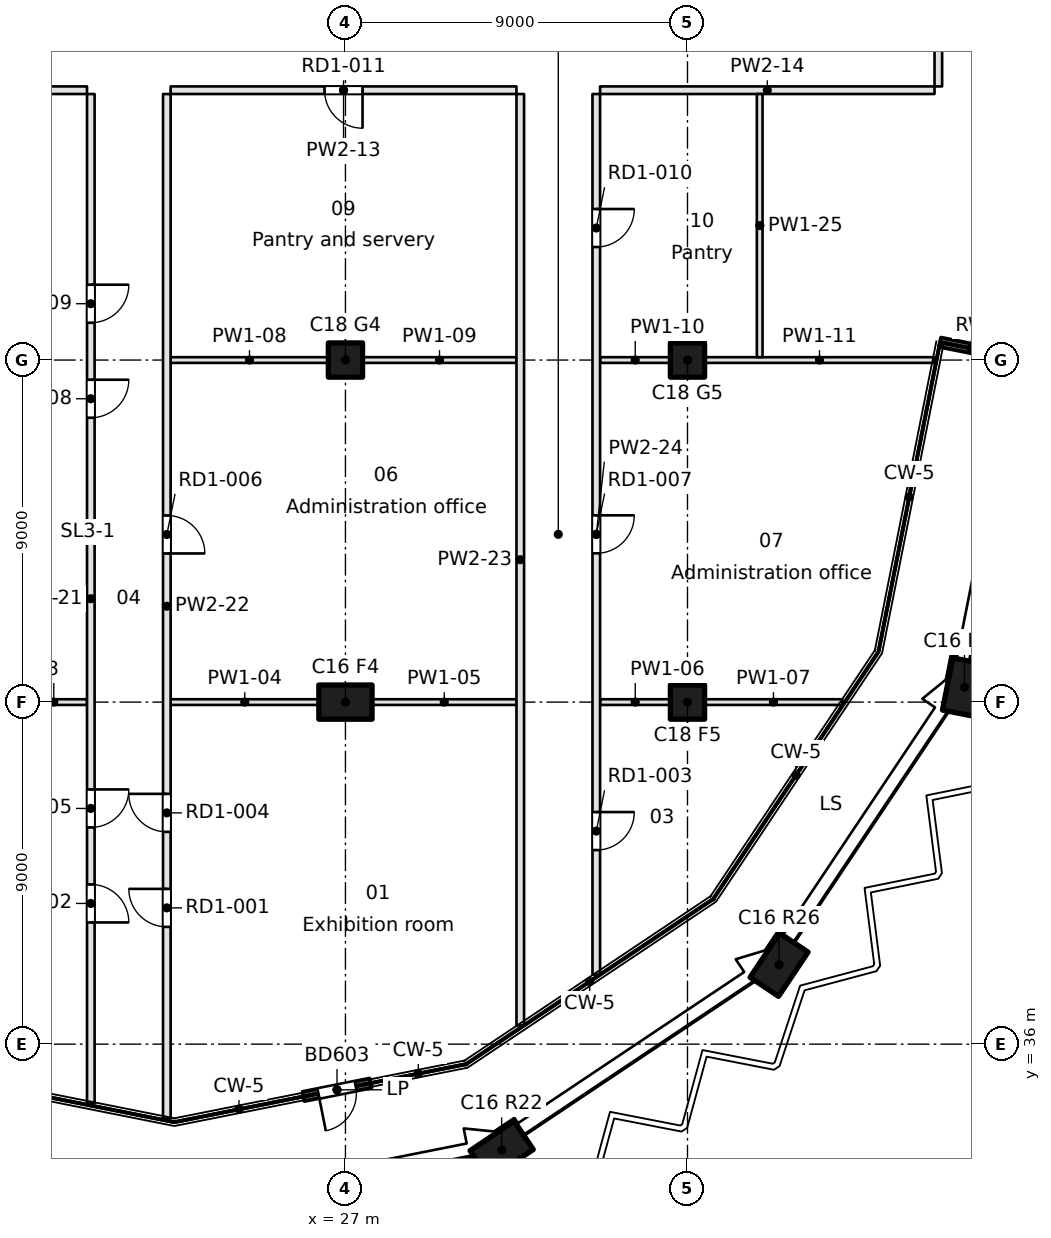
"""IFC4 building model, lengths in metres.
Left out: names, types, materials, properties, quantities, classifications, styles, units other than length and angle.
Written with IfcOpenShell. Run it as: python <this file> out.ifc"""

import sys

from ifc_helpers import new_model, si_unit, direction, frame, frame_2d, origin, origin_2d, place, context, subcontext, project, spatial, rectangle, extrude, element, fill, save


model = new_model("IFC4")
c1 = context("Model", 3, precision=1e-05, world=origin(), true_north=direction((0.0, 1.0)))
c2 = subcontext(c1, "Body", "Model", "MODEL_VIEW")
j1 = project(units=[si_unit("LENGTHUNIT", "METRE"), si_unit("PLANEANGLEUNIT", "RADIAN")], contexts=[c1])
p1 = place(None, origin())
s1 = spatial("IfcSite", under=j1, at=p1, CompositionType="ELEMENT")
p2 = place(p1, origin())
s2 = spatial("IfcBuilding", under=s1, at=p2, CompositionType="ELEMENT")
p3 = place(p2, frame((0.0, 0.0, 280.8)))
s3 = spatial("IfcBuildingStorey", under=s2, at=p3, CompositionType="ELEMENT", Elevation=280.8)
for number, where, z_axis, x_axis in (
    (1, (31.11, 33.213, 0.0), (0.0, 0.0, 1.0), (0.831, 0.556, 0.0)),
    (2, (38.41, 38.09, 0.0), (0.0, 0.0, 1.0), (0.556, 0.831, 0.0)),
    (3, (43.287, 45.39, 0.0), (0.0, 0.0, 1.0), (0.195, 0.981, 0.0)),
    (4, (27.0, 45.0, 0.0), (0.0, 0.0, 1.0), (1.0, 0.0, 0.0)),
):
    element("IfcColumn", number, at=place(p3, frame(where, z_axis=z_axis, x_axis=x_axis)), inside=s3, PredefinedType="COLUMN", context=c2, shape_type="SweptSolid", body=[
        extrude(rectangle(XDim=1.4, YDim=0.9, at=origin_2d()), origin(), (0.0, 0.0, 1.0), 3.7),
    ])
for number, where, z_axis, x_axis in (
    (5, (27.0, 54.0, 0.0), (0.0, 0.0, 1.0), (1.0, 0.0, 0.0)),
    (6, (36.0, 45.0, 0.0), (0.0, 0.0, 1.0), (1.0, 0.0, 0.0)),
    (7, (36.0, 54.0, 0.0), (0.0, 0.0, 1.0), (1.0, 0.0, 0.0)),
):
    element("IfcColumn", number, at=place(p3, frame(where, z_axis=z_axis, x_axis=x_axis)), inside=s3, PredefinedType="COLUMN", context=c2, shape_type="SweptSolid", body=[
        extrude(rectangle(XDim=0.9, YDim=0.9, at=origin_2d()), origin(), (0.0, 0.0, 1.0), 3.7),
    ])
p4 = place(p3, frame((25.896, 34.624, 0.0), z_axis=(0.0, 0.0, 1.0), x_axis=(0.980793982239, 0.195046569833, 0.0)))
e8 = element("IfcWall", 8, at=p4, inside=s3, PredefinedType="SOLIDWALL", context=c2, shape_type="SweptSolid", body=[
    extrude(rectangle(XDim=1.8, YDim=0.25, at=frame_2d((0.9, 0.0))), origin(), (0.0, 0.0, 1.0), 3.3),
])
p5 = place(p4, frame((0.4, 0.0, 0.0)))
e9 = element("IfcOpeningElement", 9, at=p5, cuts=e8, PredefinedType="OPENING", context=c2, shape_type="SweptSolid", body=[
    extrude(rectangle(XDim=1.0, YDim=2.1, at=frame_2d((0.5, 1.05))), frame((0.0, 0.125, 0.0), z_axis=(0.0, -1.0, 0.0), x_axis=(1.0, 0.0, 0.0)), (0.0, 0.0, 1.0), 0.25),
])
p6 = place(p3, frame((42.645, 54.469, 0.0), z_axis=(0.0, 0.0, 1.0), x_axis=(0.980846923473, -0.194780165092, 0.0)))
e10 = element("IfcWall", 10, at=p6, inside=s3, PredefinedType="SOLIDWALL", context=c2, shape_type="SweptSolid", body=[
    extrude(rectangle(XDim=1.687, YDim=0.25, at=frame_2d((0.844, 0.0))), origin(), (0.0, 0.0, 1.0), 3.3),
])
p7 = place(p3, frame((18.45, 45.0, 0.0), z_axis=(0.0, 0.0, 1.0), x_axis=(1.0, 0.0, 0.0)))
e11 = element("IfcWall", 11, at=p7, inside=s3, PredefinedType="PARTITIONING", context=c2, shape_type="SweptSolid", body=[
    extrude(rectangle(XDim=1.75, YDim=0.15, at=frame_2d((0.875, 0.0))), origin(), (0.0, 0.0, 1.0), 3.3),
])
p8 = place(p3, frame((22.4, 45.0, 0.0), z_axis=(0.0, 0.0, 1.0), x_axis=(1.0, 0.0, 0.0)))
e12 = element("IfcWall", 12, at=p8, inside=s3, PredefinedType="PARTITIONING", context=c2, shape_type="SweptSolid", body=[
    extrude(rectangle(XDim=3.9, YDim=0.15, at=frame_2d((1.95, 0.0))), origin(), (0.0, 0.0, 1.0), 3.3),
])
p9 = place(p3, frame((27.7, 45.0, 0.0), z_axis=(0.0, 0.0, 1.0), x_axis=(1.0, 0.0, 0.0)))
e13 = element("IfcWall", 13, at=p9, inside=s3, PredefinedType="PARTITIONING", context=c2, shape_type="SweptSolid", body=[
    extrude(rectangle(XDim=3.8, YDim=0.15, at=frame_2d((1.9, 0.0))), origin(), (0.0, 0.0, 1.0), 3.3),
])
p10 = place(p3, frame((33.7, 45.0, 0.0), z_axis=(0.0, 0.0, 1.0), x_axis=(1.0, 0.0, 0.0)))
e14 = element("IfcWall", 14, at=p10, inside=s3, PredefinedType="PARTITIONING", context=c2, shape_type="SweptSolid", body=[
    extrude(rectangle(XDim=1.85, YDim=0.15, at=frame_2d((0.925, 0.0))), origin(), (0.0, 0.0, 1.0), 3.3),
])
p11 = place(p3, frame((36.45, 45.0, 0.0), z_axis=(0.0, 0.0, 1.0), x_axis=(1.0, 0.0, 0.0)))
e15 = element("IfcWall", 15, at=p11, inside=s3, PredefinedType="PARTITIONING", context=c2, shape_type="SweptSolid", body=[
    extrude(rectangle(XDim=3.625, YDim=0.15, at=frame_2d((1.812, 0.0))), origin(), (0.0, 0.0, 1.0), 3.3),
])
p12 = place(p3, frame((22.4, 54.0, 0.0), z_axis=(0.0, 0.0, 1.0), x_axis=(1.0, 0.0, 0.0)))
e16 = element("IfcWall", 16, at=p12, inside=s3, PredefinedType="PARTITIONING", context=c2, shape_type="SweptSolid", body=[
    extrude(rectangle(XDim=4.15, YDim=0.15, at=frame_2d((2.075, 0.0))), origin(), (0.0, 0.0, 1.0), 3.3),
])
p13 = place(p3, frame((27.45, 54.0, 0.0), z_axis=(0.0, 0.0, 1.0), x_axis=(1.0, 0.0, 0.0)))
e17 = element("IfcWall", 17, at=p13, inside=s3, PredefinedType="PARTITIONING", context=c2, shape_type="SweptSolid", body=[
    extrude(rectangle(XDim=4.05, YDim=0.15, at=frame_2d((2.025, 0.0))), origin(), (0.0, 0.0, 1.0), 3.3),
])
p14 = place(p3, frame((33.7, 54.0, 0.0), z_axis=(0.0, 0.0, 1.0), x_axis=(1.0, 0.0, 0.0)))
e18 = element("IfcWall", 18, at=p14, inside=s3, PredefinedType="PARTITIONING", context=c2, shape_type="SweptSolid", body=[
    extrude(rectangle(XDim=1.85, YDim=0.15, at=frame_2d((0.925, 0.0))), origin(), (0.0, 0.0, 1.0), 3.3),
])
p15 = place(p3, frame((36.45, 54.0, 0.0), z_axis=(0.0, 0.0, 1.0), x_axis=(1.0, 0.0, 0.0)))
e19 = element("IfcWall", 19, at=p15, inside=s3, PredefinedType="PARTITIONING", context=c2, shape_type="SweptSolid", body=[
    extrude(rectangle(XDim=6.047, YDim=0.15, at=frame_2d((3.023, 0.0))), origin(), (0.0, 0.0, 1.0), 3.3),
])
p16 = place(p3, frame((20.2, 61.1, 0.0), z_axis=(0.0, 0.0, 1.0), x_axis=(-1.0, 0.0, 0.0)))
e20 = element("IfcWall", 20, at=p16, inside=s3, PredefinedType="PARTITIONING", context=c2, shape_type="SweptSolid", body=[
    extrude(rectangle(XDim=11.296, YDim=0.2, at=frame_2d((5.648, 0.0))), origin(), (0.0, 0.0, 1.0), 3.3),
])
p17 = place(p3, frame((31.5, 61.1, 0.0), z_axis=(0.0, 0.0, 1.0), x_axis=(-1.0, 0.0, 0.0)))
e21 = element("IfcWall", 21, at=p17, inside=s3, PredefinedType="PARTITIONING", context=c2, shape_type="SweptSolid", body=[
    extrude(rectangle(XDim=9.1, YDim=0.2, at=frame_2d((4.55, 0.0))), origin(), (0.0, 0.0, 1.0), 3.3),
])
p18 = place(p17, frame((4.05, 0.0, 0.0)))
e22 = element("IfcOpeningElement", 22, at=p18, cuts=e21, PredefinedType="OPENING", context=c2, shape_type="SweptSolid", body=[
    extrude(rectangle(XDim=1.0, YDim=2.1, at=frame_2d((0.5, 1.05))), frame((0.0, 0.1, 0.0), z_axis=(0.0, -1.0, 0.0), x_axis=(1.0, 0.0, 0.0)), (0.0, 0.0, 1.0), 0.2),
])
p19 = place(p3, frame((42.5, 61.1, 0.0), z_axis=(0.0, 0.0, 1.0), x_axis=(-1.0, 0.0, 0.0)))
e23 = element("IfcWall", 23, at=p19, inside=s3, PredefinedType="PARTITIONING", context=c2, shape_type="SweptSolid", body=[
    extrude(rectangle(XDim=8.8, YDim=0.2, at=frame_2d((4.4, 0.0))), origin(), (0.0, 0.0, 1.0), 3.3),
])
p20 = place(p3, frame((20.3, 34.441, 0.0), z_axis=(0.0, 0.0, 1.0), x_axis=(0.0, 1.0, 0.0)))
e24 = element("IfcWall", 24, at=p20, inside=s3, PredefinedType="PARTITIONING", context=c2, shape_type="SweptSolid", body=[
    extrude(rectangle(XDim=26.559, YDim=0.2, at=frame_2d((13.28, 0.0))), origin(), (0.0, 0.0, 1.0), 3.3),
])
p21 = place(p20, frame((4.762, 0.0, 0.0)))
e25 = element("IfcOpeningElement", 25, at=p21, cuts=e24, PredefinedType="OPENING", context=c2, shape_type="SweptSolid", body=[
    extrude(rectangle(XDim=1.0, YDim=2.1, at=frame_2d((0.5, 1.05))), frame((0.0, 0.1, 0.0), z_axis=(0.0, -1.0, 0.0), x_axis=(1.0, 0.0, 0.0)), (0.0, 0.0, 1.0), 0.2),
])
p22 = place(p20, frame((7.262, 0.0, 0.0)))
e26 = element("IfcOpeningElement", 26, at=p22, cuts=e24, PredefinedType="OPENING", context=c2, shape_type="SweptSolid", body=[
    extrude(rectangle(XDim=1.0, YDim=2.1, at=frame_2d((0.5, 1.05))), frame((0.0, 0.1, 0.0), z_axis=(0.0, -1.0, 0.0), x_axis=(1.0, 0.0, 0.0)), (0.0, 0.0, 1.0), 0.2),
])
p23 = place(p20, frame((18.042, 0.0, 0.0)))
e27 = element("IfcOpeningElement", 27, at=p23, cuts=e24, PredefinedType="OPENING", context=c2, shape_type="SweptSolid", body=[
    extrude(rectangle(XDim=1.0, YDim=2.1, at=frame_2d((0.5, 1.05))), frame((0.0, 0.1, 0.0), z_axis=(0.0, -1.0, 0.0), x_axis=(1.0, 0.0, 0.0)), (0.0, 0.0, 1.0), 0.2),
])
p24 = place(p20, frame((20.542, 0.0, 0.0)))
e28 = element("IfcOpeningElement", 28, at=p24, cuts=e24, PredefinedType="OPENING", context=c2, shape_type="SweptSolid", body=[
    extrude(rectangle(XDim=1.0, YDim=2.1, at=frame_2d((0.5, 1.05))), frame((0.0, 0.1, 0.0), z_axis=(0.0, -1.0, 0.0), x_axis=(1.0, 0.0, 0.0)), (0.0, 0.0, 1.0), 0.2),
])
p25 = place(p3, frame((22.3, 61.0, 0.0), z_axis=(0.0, 0.0, 1.0), x_axis=(0.0, -1.0, 0.0)))
e29 = element("IfcWall", 29, at=p25, inside=s3, PredefinedType="PARTITIONING", context=c2, shape_type="SweptSolid", body=[
    extrude(rectangle(XDim=26.957, YDim=0.2, at=frame_2d((13.479, 0.0))), origin(), (0.0, 0.0, 1.0), 3.3),
])
p26 = place(p25, frame((20.915, 0.0, 0.0)))
e30 = element("IfcOpeningElement", 30, at=p26, cuts=e29, PredefinedType="OPENING", context=c2, shape_type="SweptSolid", body=[
    extrude(rectangle(XDim=1.0, YDim=2.1, at=frame_2d((0.5, 1.05))), frame((0.0, 0.1, 0.0), z_axis=(0.0, -1.0, 0.0), x_axis=(1.0, 0.0, 0.0)), (0.0, 0.0, 1.0), 0.2),
])
p27 = place(p25, frame((18.415, 0.0, 0.0)))
e31 = element("IfcOpeningElement", 31, at=p27, cuts=e29, PredefinedType="OPENING", context=c2, shape_type="SweptSolid", body=[
    extrude(rectangle(XDim=1.0, YDim=2.1, at=frame_2d((0.5, 1.05))), frame((0.0, 0.1, 0.0), z_axis=(0.0, -1.0, 0.0), x_axis=(1.0, 0.0, 0.0)), (0.0, 0.0, 1.0), 0.2),
])
p28 = place(p25, frame((11.089, 0.0, 0.0)))
e32 = element("IfcOpeningElement", 32, at=p28, cuts=e29, PredefinedType="OPENING", context=c2, shape_type="SweptSolid", body=[
    extrude(rectangle(XDim=1.0, YDim=2.1, at=frame_2d((0.5, 1.05))), frame((0.0, 0.1, 0.0), z_axis=(0.0, -1.0, 0.0), x_axis=(1.0, 0.0, 0.0)), (0.0, 0.0, 1.0), 0.2),
])
p29 = place(p3, frame((31.6, 36.492, 0.0), z_axis=(0.0, 0.0, 1.0), x_axis=(0.0, 1.0, 0.0)))
e33 = element("IfcWall", 33, at=p29, inside=s3, PredefinedType="PARTITIONING", context=c2, shape_type="SweptSolid", body=[
    extrude(rectangle(XDim=24.508, YDim=0.2, at=frame_2d((12.254, 0.0))), origin(), (0.0, 0.0, 1.0), 3.3),
])
p30 = place(p3, frame((33.6, 61.0, 0.0), z_axis=(0.0, 0.0, 1.0), x_axis=(0.0, -1.0, 0.0)))
e34 = element("IfcWall", 34, at=p30, inside=s3, PredefinedType="PARTITIONING", context=c2, shape_type="SweptSolid", body=[
    extrude(rectangle(XDim=23.171, YDim=0.2, at=frame_2d((11.585, 0.0))), origin(), (0.0, 0.0, 1.0), 3.3),
])
p31 = place(p30, frame((18.893, 0.0, 0.0)))
e35 = element("IfcOpeningElement", 35, at=p31, cuts=e34, PredefinedType="OPENING", context=c2, shape_type="SweptSolid", body=[
    extrude(rectangle(XDim=1.0, YDim=2.1, at=frame_2d((0.5, 1.05))), frame((0.0, 0.1, 0.0), z_axis=(0.0, -1.0, 0.0), x_axis=(1.0, 0.0, 0.0)), (0.0, 0.0, 1.0), 0.2),
])
p32 = place(p30, frame((11.086, 0.0, 0.0)))
e36 = element("IfcOpeningElement", 36, at=p32, cuts=e34, PredefinedType="OPENING", context=c2, shape_type="SweptSolid", body=[
    extrude(rectangle(XDim=1.0, YDim=2.1, at=frame_2d((0.5, 1.05))), frame((0.0, 0.1, 0.0), z_axis=(0.0, -1.0, 0.0), x_axis=(1.0, 0.0, 0.0)), (0.0, 0.0, 1.0), 0.2),
])
p33 = place(p30, frame((3.026, 0.0, 0.0)))
e37 = element("IfcOpeningElement", 37, at=p33, cuts=e34, PredefinedType="OPENING", context=c2, shape_type="SweptSolid", body=[
    extrude(rectangle(XDim=1.0, YDim=2.1, at=frame_2d((0.5, 1.05))), frame((0.0, 0.1, 0.0), z_axis=(0.0, -1.0, 0.0), x_axis=(1.0, 0.0, 0.0)), (0.0, 0.0, 1.0), 0.2),
])
p34 = place(p3, frame((37.9, 61.0, 0.0), z_axis=(0.0, 0.0, 1.0), x_axis=(0.0, -1.0, 0.0)))
e38 = element("IfcWall", 38, at=p34, inside=s3, PredefinedType="PARTITIONING", context=c2, shape_type="SweptSolid", body=[
    extrude(rectangle(XDim=6.925, YDim=0.15, at=frame_2d((3.462, 0.0))), origin(), (0.0, 0.0, 1.0), 3.3),
])
p35 = place(p3, frame((42.6, 63.6, 0.0), z_axis=(0.0, 0.0, 1.0), x_axis=(0.0, -1.0, 0.0)))
e39 = element("IfcWall", 39, at=p35, inside=s3, PredefinedType="PARTITIONING", context=c2, shape_type="SweptSolid", body=[
    extrude(rectangle(XDim=2.4, YDim=0.2, at=frame_2d((1.2, 0.0))), origin(), (0.0, 0.0, 1.0), 3.3),
])
p36 = place(p5, frame((1.0, 0.0, 0.0), z_axis=(0.0, 0.0, 1.0), x_axis=(-1.0, 0.0, 0.0)))
e40 = element("IfcDoor", 40, at=p36, inside=s3, OperationType="SINGLE_SWING_RIGHT", PredefinedType="DOOR", context=c2, shape_type="SweptSolid", body=[
    extrude(rectangle(XDim=1.0, YDim=2.1, at=frame_2d((0.5, 1.05))), frame((0.0, 0.025, 0.0), z_axis=(0.0, -1.0, 0.0), x_axis=(1.0, 0.0, 0.0)), (0.0, 0.0, 1.0), 0.05),
])
fill(e9, e40)
p37 = place(p26, frame((1.0, 0.0, 0.0), z_axis=(0.0, 0.0, 1.0), x_axis=(-1.0, 0.0, 0.0)))
e41 = element("IfcDoor", 41, at=p37, inside=s3, OperationType="SINGLE_SWING_RIGHT", PredefinedType="DOOR", context=c2, shape_type="SweptSolid", body=[
    extrude(rectangle(XDim=1.0, YDim=2.1, at=frame_2d((0.5, 1.05))), frame((0.0, 0.025, 0.0), z_axis=(0.0, -1.0, 0.0), x_axis=(1.0, 0.0, 0.0)), (0.0, 0.0, 1.0), 0.05),
])
fill(e30, e41)
p38 = place(p21, frame((1.0, 0.0, 0.0), z_axis=(0.0, 0.0, 1.0), x_axis=(-1.0, 0.0, 0.0)))
e42 = element("IfcDoor", 42, at=p38, inside=s3, OperationType="SINGLE_SWING_RIGHT", PredefinedType="DOOR", context=c2, shape_type="SweptSolid", body=[
    extrude(rectangle(XDim=1.0, YDim=2.1, at=frame_2d((0.5, 1.05))), frame((0.0, 0.025, 0.0), z_axis=(0.0, -1.0, 0.0), x_axis=(1.0, 0.0, 0.0)), (0.0, 0.0, 1.0), 0.05),
])
fill(e25, e42)
p39 = place(p31, origin())
e43 = element("IfcDoor", 43, at=p39, inside=s3, OperationType="SINGLE_SWING_LEFT", PredefinedType="DOOR", context=c2, shape_type="SweptSolid", body=[
    extrude(rectangle(XDim=1.0, YDim=2.1, at=frame_2d((0.5, 1.05))), frame((0.0, 0.025, 0.0), z_axis=(0.0, -1.0, 0.0), x_axis=(1.0, 0.0, 0.0)), (0.0, 0.0, 1.0), 0.05),
])
fill(e35, e43)
p40 = place(p27, frame((1.0, 0.0, 0.0), z_axis=(0.0, 0.0, 1.0), x_axis=(-1.0, 0.0, 0.0)))
e44 = element("IfcDoor", 44, at=p40, inside=s3, OperationType="SINGLE_SWING_RIGHT", PredefinedType="DOOR", context=c2, shape_type="SweptSolid", body=[
    extrude(rectangle(XDim=1.0, YDim=2.1, at=frame_2d((0.5, 1.05))), frame((0.0, 0.025, 0.0), z_axis=(0.0, -1.0, 0.0), x_axis=(1.0, 0.0, 0.0)), (0.0, 0.0, 1.0), 0.05),
])
fill(e31, e44)
p41 = place(p22, frame((1.0, 0.0, 0.0), z_axis=(0.0, 0.0, 1.0), x_axis=(-1.0, 0.0, 0.0)))
e45 = element("IfcDoor", 45, at=p41, inside=s3, OperationType="SINGLE_SWING_LEFT", PredefinedType="DOOR", context=c2, shape_type="SweptSolid", body=[
    extrude(rectangle(XDim=1.0, YDim=2.1, at=frame_2d((0.5, 1.05))), frame((0.0, 0.025, 0.0), z_axis=(0.0, -1.0, 0.0), x_axis=(1.0, 0.0, 0.0)), (0.0, 0.0, 1.0), 0.05),
])
fill(e26, e45)
p42 = place(p28, origin())
e46 = element("IfcDoor", 46, at=p42, inside=s3, OperationType="SINGLE_SWING_RIGHT", PredefinedType="DOOR", context=c2, shape_type="SweptSolid", body=[
    extrude(rectangle(XDim=1.0, YDim=2.1, at=frame_2d((0.5, 1.05))), frame((0.0, 0.025, 0.0), z_axis=(0.0, -1.0, 0.0), x_axis=(1.0, 0.0, 0.0)), (0.0, 0.0, 1.0), 0.05),
])
fill(e32, e46)
p43 = place(p32, origin())
e47 = element("IfcDoor", 47, at=p43, inside=s3, OperationType="SINGLE_SWING_LEFT", PredefinedType="DOOR", context=c2, shape_type="SweptSolid", body=[
    extrude(rectangle(XDim=1.0, YDim=2.1, at=frame_2d((0.5, 1.05))), frame((0.0, 0.025, 0.0), z_axis=(0.0, -1.0, 0.0), x_axis=(1.0, 0.0, 0.0)), (0.0, 0.0, 1.0), 0.05),
])
fill(e36, e47)
p44 = place(p23, frame((1.0, 0.0, 0.0), z_axis=(0.0, 0.0, 1.0), x_axis=(-1.0, 0.0, 0.0)))
e48 = element("IfcDoor", 48, at=p44, inside=s3, OperationType="SINGLE_SWING_LEFT", PredefinedType="DOOR", context=c2, shape_type="SweptSolid", body=[
    extrude(rectangle(XDim=1.0, YDim=2.1, at=frame_2d((0.5, 1.05))), frame((0.0, 0.025, 0.0), z_axis=(0.0, -1.0, 0.0), x_axis=(1.0, 0.0, 0.0)), (0.0, 0.0, 1.0), 0.05),
])
fill(e27, e48)
p45 = place(p24, frame((1.0, 0.0, 0.0), z_axis=(0.0, 0.0, 1.0), x_axis=(-1.0, 0.0, 0.0)))
e49 = element("IfcDoor", 49, at=p45, inside=s3, OperationType="SINGLE_SWING_LEFT", PredefinedType="DOOR", context=c2, shape_type="SweptSolid", body=[
    extrude(rectangle(XDim=1.0, YDim=2.1, at=frame_2d((0.5, 1.05))), frame((0.0, 0.025, 0.0), z_axis=(0.0, -1.0, 0.0), x_axis=(1.0, 0.0, 0.0)), (0.0, 0.0, 1.0), 0.05),
])
fill(e28, e49)
p46 = place(p33, origin())
e50 = element("IfcDoor", 50, at=p46, inside=s3, OperationType="SINGLE_SWING_LEFT", PredefinedType="DOOR", context=c2, shape_type="SweptSolid", body=[
    extrude(rectangle(XDim=1.0, YDim=2.1, at=frame_2d((0.5, 1.05))), frame((0.0, 0.025, 0.0), z_axis=(0.0, -1.0, 0.0), x_axis=(1.0, 0.0, 0.0)), (0.0, 0.0, 1.0), 0.05),
])
fill(e37, e50)
p47 = place(p18, origin())
e51 = element("IfcDoor", 51, at=p47, inside=s3, OperationType="SINGLE_SWING_LEFT", PredefinedType="DOOR", context=c2, shape_type="SweptSolid", body=[
    extrude(rectangle(XDim=1.0, YDim=2.1, at=frame_2d((0.5, 1.05))), frame((0.0, 0.025, 0.0), z_axis=(0.0, -1.0, 0.0), x_axis=(1.0, 0.0, 0.0)), (0.0, 0.0, 1.0), 0.05),
])
fill(e22, e51)
save(model, sys.argv[1])
